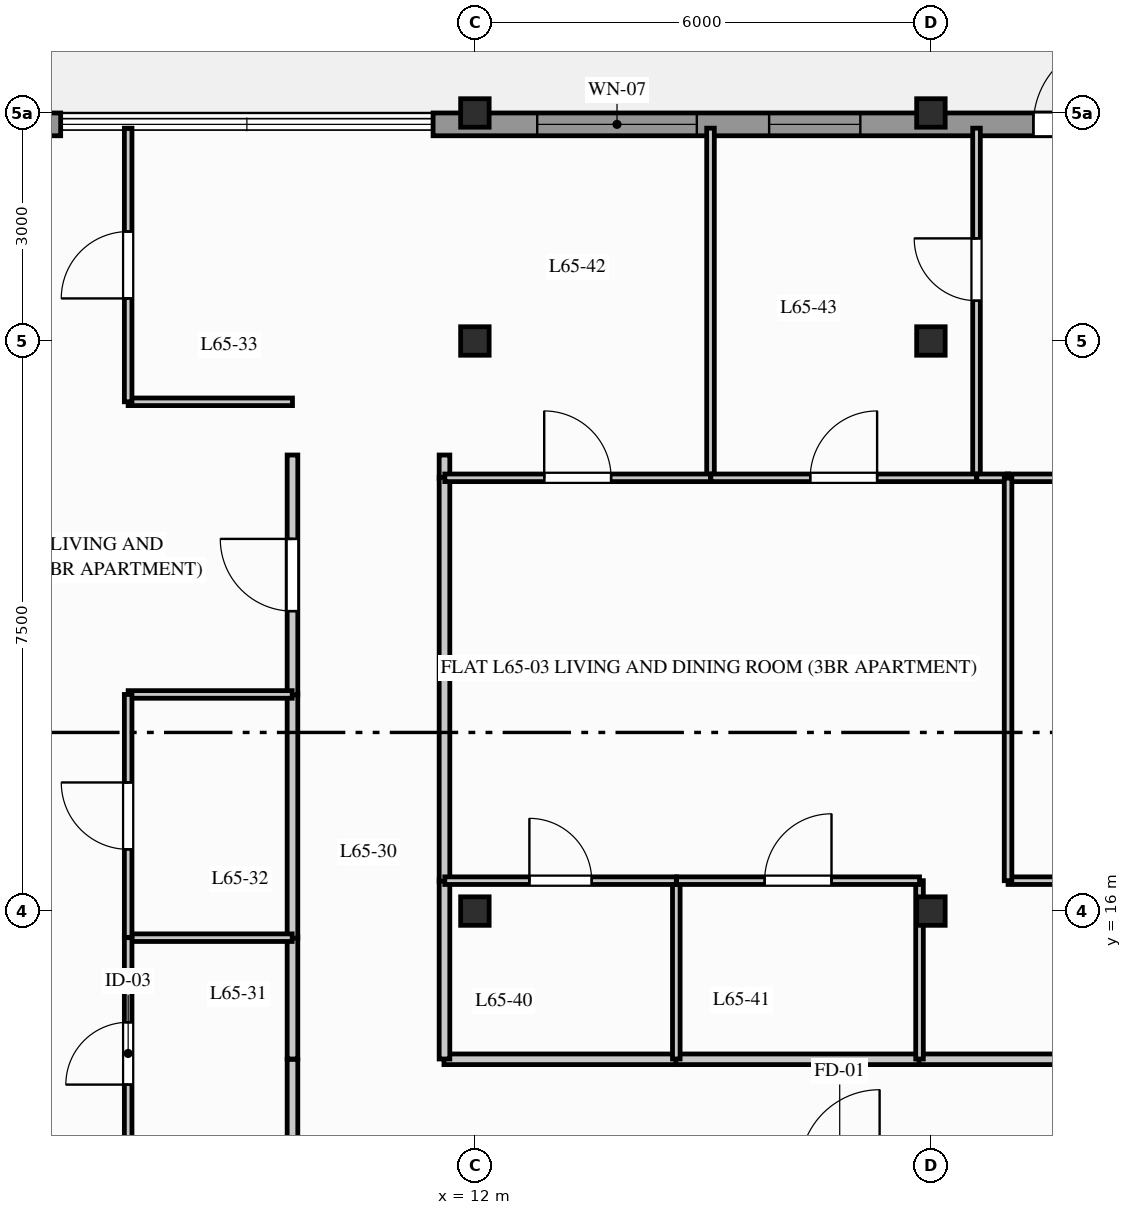
"""IFC4 building model, lengths in metres.
Left out: names, types, materials, properties, quantities, classifications, styles, units other than length and angle.
Written with IfcOpenShell. Run it as: python <this file> out.ifc"""

import sys

from ifc_helpers import new_model, si_unit, direction, frame, frame_2d, origin, origin_2d, place, context, subcontext, project, spatial, rectangle, i_section, extrude, element, fill, save


model = new_model("IFC4")
c1 = context("Model", 3, precision=1e-05, world=origin(), true_north=direction((0.0, 1.0)))
c2 = subcontext(c1, "Body", "Model", "MODEL_VIEW")
j1 = project(units=[si_unit("LENGTHUNIT", "METRE"), si_unit("PLANEANGLEUNIT", "RADIAN")], contexts=[c1])
p1 = place(None, origin())
s1 = spatial("IfcSite", under=j1, at=p1, CompositionType="ELEMENT")
p2 = place(p1, origin())
s2 = spatial("IfcBuilding", under=s1, at=p2, CompositionType="ELEMENT")
p3 = place(p2, frame((0.0, 0.0, 214.4)))
s3 = spatial("IfcBuildingStorey", under=s2, at=p3, CompositionType="ELEMENT", Elevation=214.4)
for number, where, z_axis, x_axis in (
    (1, (12.0, 16.0, 0.0), (0.0, 0.0, 1.0), (1.0, 0.0, 0.0)),
    (2, (12.0, 23.5, 0.0), (0.0, 0.0, 1.0), (1.0, 0.0, 0.0)),
    (3, (12.0, 26.5, 0.0), (0.0, 0.0, 1.0), (1.0, 0.0, 0.0)),
    (4, (18.0, 16.0, 0.0), (0.0, 0.0, 1.0), (1.0, 0.0, 0.0)),
    (5, (18.0, 23.5, 0.0), (0.0, 0.0, 1.0), (1.0, 0.0, 0.0)),
    (6, (18.0, 26.5, 0.0), (0.0, 0.0, 1.0), (1.0, 0.0, 0.0)),
):
    element("IfcColumn", number, at=place(p3, frame(where, z_axis=z_axis, x_axis=x_axis)), inside=s3, PredefinedType="COLUMN", context=c2, shape_type="SweptSolid", body=[
        extrude(i_section(OverallWidth=0.375, OverallDepth=0.375, WebThickness=0.017, FlangeThickness=0.027, FilletRadius=0.015, at=origin_2d()), origin(), (0.0, 0.0, 1.0), 3.6),
    ])
p4 = place(p3, frame((2.5, 26.35, 0.0), z_axis=(0.0, 0.0, 1.0), x_axis=(1.0, 0.0, 0.0)))
e7 = element("IfcWall", 7, at=p4, inside=s3, PredefinedType="STANDARD", context=c2, shape_type="SweptSolid", body=[
    extrude(rectangle(XDim=4.05, YDim=0.3, at=frame_2d((2.025, 0.0))), origin(), (0.0, 0.0, 1.0), 3.33),
])
p5 = place(p3, frame((11.45, 26.35, 0.0), z_axis=(0.0, 0.0, 1.0), x_axis=(1.0, 0.0, 0.0)))
e8 = element("IfcWall", 8, at=p5, inside=s3, PredefinedType="STANDARD", context=c2, shape_type="SweptSolid", body=[
    extrude(rectangle(XDim=16.35, YDim=0.3, at=frame_2d((8.175, 0.0))), origin(), (0.0, 0.0, 1.0), 2.454),
])
p6 = place(p5, frame((7.898, 0.0, 0.0)))
e9 = element("IfcOpeningElement", 9, at=p6, cuts=e8, PredefinedType="OPENING", context=c2, shape_type="SweptSolid", body=[
    extrude(rectangle(XDim=1.1, YDim=2.2, at=frame_2d((0.55, 1.1))), frame((0.0, 0.16, 0.0), z_axis=(0.0, -1.0, 0.0), x_axis=(1.0, 0.0, 0.0)), (0.0, 0.0, 1.0), 0.32),
])
p7 = place(p5, frame((1.37, 0.0, 0.284)))
e10 = element("IfcOpeningElement", 10, at=p7, cuts=e8, PredefinedType="OPENING", context=c2, shape_type="SweptSolid", body=[
    extrude(rectangle(XDim=2.1, YDim=1.95, at=frame_2d((1.05, 0.975))), frame((0.0, 0.16, 0.0), z_axis=(0.0, -1.0, 0.0), x_axis=(1.0, 0.0, 0.0)), (0.0, 0.0, 1.0), 0.32),
])
p8 = place(p5, frame((4.421, 0.0, 0.634)))
e11 = element("IfcOpeningElement", 11, at=p8, cuts=e8, PredefinedType="OPENING", context=c2, shape_type="SweptSolid", body=[
    extrude(rectangle(XDim=1.2, YDim=1.6, at=frame_2d((0.6, 0.8))), frame((0.0, 0.16, 0.0), z_axis=(0.0, -1.0, 0.0), x_axis=(1.0, 0.0, 0.0)), (0.0, 0.0, 1.0), 0.32),
])
p9 = place(p3, frame((9.6, 12.6, 0.0), z_axis=(0.0, 0.0, 1.0), x_axis=(0.0, 1.0, 0.0)))
e12 = element("IfcWall", 12, at=p9, inside=s3, PredefinedType="PARTITIONING", context=c2, shape_type="SweptSolid", body=[
    extrude(rectangle(XDim=1.45, YDim=0.14, at=frame_2d((0.725, 0.0))), origin(), (0.0, 0.0, 1.0), 3.33),
])
p10 = place(p3, frame((11.593, 14.05, 0.0), z_axis=(0.0, 0.0, 1.0), x_axis=(1.0, 0.0, 0.0)))
e13 = element("IfcWall", 13, at=p10, inside=s3, PredefinedType="PARTITIONING", context=c2, shape_type="SweptSolid", body=[
    extrude(rectangle(XDim=3.069, YDim=0.14, at=frame_2d((1.534, 0.0))), origin(), (0.0, 0.0, 1.0), 2.685),
])
p11 = place(p3, frame((14.643, 14.05, 0.0), z_axis=(0.0, 0.0, 1.0), x_axis=(1.0, 0.0, 0.0)))
e14 = element("IfcWall", 14, at=p11, inside=s3, PredefinedType="PARTITIONING", context=c2, shape_type="SweptSolid", body=[
    extrude(rectangle(XDim=3.219, YDim=0.14, at=frame_2d((1.609, 0.0))), origin(), (0.0, 0.0, 1.0), 2.685),
])
p12 = place(p3, frame((17.843, 14.05, 0.0), z_axis=(0.0, 0.0, 1.0), x_axis=(1.0, 0.0, 0.0)))
e15 = element("IfcWall", 15, at=p12, inside=s3, PredefinedType="PARTITIONING", context=c2, shape_type="SweptSolid", body=[
    extrude(rectangle(XDim=6.668, YDim=0.14, at=frame_2d((3.334, 0.0))), origin(), (0.0, 0.0, 1.0), 2.685),
])
p13 = place(p12, frame((2.859, 0.0, 0.0)))
e16 = element("IfcOpeningElement", 16, at=p13, cuts=e15, PredefinedType="OPENING", context=c2, shape_type="SweptSolid", body=[
    extrude(rectangle(XDim=0.95, YDim=2.05, at=frame_2d((0.475, 1.025))), frame((0.0, 0.08, 0.0), z_axis=(0.0, -1.0, 0.0), x_axis=(1.0, 0.0, 0.0)), (0.0, 0.0, 1.0), 0.16),
])
p14 = place(p3, frame((9.6, 14.054, 0.0), z_axis=(0.0, 0.0, 1.0), x_axis=(0.0, 1.0, 0.0)))
e17 = element("IfcWall", 17, at=p14, inside=s3, PredefinedType="PARTITIONING", context=c2, shape_type="SweptSolid", body=[
    extrude(rectangle(XDim=1.607, YDim=0.14, at=frame_2d((0.804, 0.0))), origin(), (0.0, 0.0, 1.0), 3.33),
])
p15 = place(p3, frame((9.6, 15.643, 0.0), z_axis=(0.0, 0.0, 1.0), x_axis=(0.0, 1.0, 0.0)))
e18 = element("IfcWall", 18, at=p15, inside=s3, PredefinedType="PARTITIONING", context=c2, shape_type="SweptSolid", body=[
    extrude(rectangle(XDim=3.219, YDim=0.14, at=frame_2d((1.609, 0.0))), origin(), (0.0, 0.0, 1.0), 2.685),
])
p16 = place(p3, frame((9.6, 18.843, 0.0), z_axis=(0.0, 0.0, 1.0), x_axis=(0.0, 1.0, 0.0)))
e19 = element("IfcWall", 19, at=p16, inside=s3, PredefinedType="PARTITIONING", context=c2, shape_type="SweptSolid", body=[
    extrude(rectangle(XDim=3.157, YDim=0.14, at=frame_2d((1.579, 0.0))), origin(), (0.0, 0.0, 1.0), 2.899),
])
p17 = place(p16, frame((1.104, 0.0, 0.0)))
e20 = element("IfcOpeningElement", 20, at=p17, cuts=e19, PredefinedType="OPENING", context=c2, shape_type="SweptSolid", body=[
    extrude(rectangle(XDim=0.95, YDim=2.05, at=frame_2d((0.475, 1.025))), frame((0.0, 0.08, 0.0), z_axis=(0.0, -1.0, 0.0), x_axis=(1.0, 0.0, 0.0)), (0.0, 0.0, 1.0), 0.16),
])
p18 = place(p3, frame((11.6, 14.054, 0.0), z_axis=(0.0, 0.0, 1.0), x_axis=(0.0, 1.0, 0.0)))
e21 = element("IfcWall", 21, at=p18, inside=s3, PredefinedType="PARTITIONING", context=c2, shape_type="SweptSolid", body=[
    extrude(rectangle(XDim=2.357, YDim=0.14, at=frame_2d((1.179, 0.0))), origin(), (0.0, 0.0, 1.0), 2.685),
])
p19 = place(p3, frame((11.6, 21.689, 0.0), z_axis=(0.0, 0.0, 1.0), x_axis=(0.0, 1.0, 0.0)))
e22 = element("IfcWall", 22, at=p19, inside=s3, PredefinedType="PARTITIONING", context=c2, shape_type="SweptSolid", body=[
    extrude(rectangle(XDim=0.311, YDim=0.14, at=frame_2d((0.156, 0.0))), origin(), (0.0, 0.0, 1.0), 3.33),
])
p20 = place(p3, frame((11.6, 16.393, 0.0), z_axis=(0.0, 0.0, 1.0), x_axis=(0.0, 1.0, 0.0)))
e23 = element("IfcWall", 23, at=p20, inside=s3, PredefinedType="PARTITIONING", context=c2, shape_type="SweptSolid", body=[
    extrude(rectangle(XDim=5.315, YDim=0.14, at=frame_2d((2.657, 0.0))), origin(), (0.0, 0.0, 1.0), 2.899),
])
p21 = place(p3, frame((7.438, 15.65, 0.0), z_axis=(0.0, 0.0, 1.0), x_axis=(1.0, 0.0, 0.0)))
e24 = element("IfcWall", 24, at=p21, inside=s3, PredefinedType="PARTITIONING", context=c2, shape_type="SweptSolid", body=[
    extrude(rectangle(XDim=2.158, YDim=0.1, at=frame_2d((1.079, 0.0))), origin(), (0.0, 0.0, 1.0), 3.33),
])
p22 = place(p3, frame((7.438, 12.604, 0.0), z_axis=(0.0, 0.0, 1.0), x_axis=(0.0, 1.0, 0.0)))
e25 = element("IfcWall", 25, at=p22, inside=s3, PredefinedType="PARTITIONING", context=c2, shape_type="SweptSolid", body=[
    extrude(rectangle(XDim=3.046, YDim=0.1, at=frame_2d((1.523, 0.0))), origin(), (0.0, 0.0, 1.0), 3.33),
])
p23 = place(p22, frame((1.113, 0.0, 0.0)))
e26 = element("IfcOpeningElement", 26, at=p23, cuts=e25, PredefinedType="OPENING", context=c2, shape_type="SweptSolid", body=[
    extrude(rectangle(XDim=0.82, YDim=2.02, at=frame_2d((0.41, 1.01))), frame((0.0, 0.06, 0.0), z_axis=(0.0, -1.0, 0.0), x_axis=(1.0, 0.0, 0.0)), (0.0, 0.0, 1.0), 0.12),
])
p24 = place(p3, frame((7.438, 18.85, 0.0), z_axis=(0.0, 0.0, 1.0), x_axis=(1.0, 0.0, 0.0)))
e27 = element("IfcWall", 27, at=p24, inside=s3, PredefinedType="PARTITIONING", context=c2, shape_type="SweptSolid", body=[
    extrude(rectangle(XDim=2.158, YDim=0.1, at=frame_2d((1.079, 0.0))), origin(), (0.0, 0.0, 1.0), 3.33),
])
p25 = place(p3, frame((7.438, 15.654, 0.0), z_axis=(0.0, 0.0, 1.0), x_axis=(0.0, 1.0, 0.0)))
e28 = element("IfcWall", 28, at=p25, inside=s3, PredefinedType="PARTITIONING", context=c2, shape_type="SweptSolid", body=[
    extrude(rectangle(XDim=3.196, YDim=0.1, at=frame_2d((1.598, 0.0))), origin(), (0.0, 0.0, 1.0), 2.685),
])
p26 = place(p25, frame((1.158, 0.0, 0.0)))
e29 = element("IfcOpeningElement", 29, at=p26, cuts=e28, PredefinedType="OPENING", context=c2, shape_type="SweptSolid", body=[
    extrude(rectangle(XDim=0.88, YDim=2.04, at=frame_2d((0.44, 1.02))), frame((0.0, 0.06, 0.0), z_axis=(0.0, -1.0, 0.0), x_axis=(1.0, 0.0, 0.0)), (0.0, 0.0, 1.0), 0.12),
])
p27 = place(p3, frame((7.438, 22.7, 0.0), z_axis=(0.0, 0.0, 1.0), x_axis=(1.0, 0.0, 0.0)))
e30 = element("IfcWall", 30, at=p27, inside=s3, PredefinedType="PARTITIONING", context=c2, shape_type="SweptSolid", body=[
    extrude(rectangle(XDim=2.162, YDim=0.1, at=frame_2d((1.081, 0.0))), origin(), (0.0, 0.0, 1.0), 3.33),
])
p28 = place(p3, frame((7.438, 22.7, 0.0), z_axis=(0.0, 0.0, 1.0), x_axis=(0.0, 1.0, 0.0)))
e31 = element("IfcWall", 31, at=p28, inside=s3, PredefinedType="PARTITIONING", context=c2, shape_type="SweptSolid", body=[
    extrude(rectangle(XDim=3.6, YDim=0.1, at=frame_2d((1.8, 0.0))), origin(), (0.0, 0.0, 1.0), 2.685),
])
p29 = place(p28, frame((1.36, 0.0, 0.0)))
e32 = element("IfcOpeningElement", 32, at=p29, cuts=e31, PredefinedType="OPENING", context=c2, shape_type="SweptSolid", body=[
    extrude(rectangle(XDim=0.88, YDim=2.04, at=frame_2d((0.44, 1.02))), frame((0.0, 0.06, 0.0), z_axis=(0.0, -1.0, 0.0), x_axis=(1.0, 0.0, 0.0)), (0.0, 0.0, 1.0), 0.12),
])
p30 = place(p3, frame((14.65, 14.054, 0.0), z_axis=(0.0, 0.0, 1.0), x_axis=(0.0, 1.0, 0.0)))
e33 = element("IfcWall", 33, at=p30, inside=s3, PredefinedType="PARTITIONING", context=c2, shape_type="SweptSolid", body=[
    extrude(rectangle(XDim=2.346, YDim=0.1, at=frame_2d((1.173, 0.0))), origin(), (0.0, 0.0, 1.0), 2.685),
])
p31 = place(p3, frame((11.604, 16.4, 0.0), z_axis=(0.0, 0.0, 1.0), x_axis=(1.0, 0.0, 0.0)))
e34 = element("IfcWall", 34, at=p31, inside=s3, PredefinedType="PARTITIONING", context=c2, shape_type="SweptSolid", body=[
    extrude(rectangle(XDim=3.046, YDim=0.1, at=frame_2d((1.523, 0.0))), origin(), (0.0, 0.0, 1.0), 2.685),
])
p32 = place(p31, frame((1.113, 0.0, 0.0)))
e35 = element("IfcOpeningElement", 35, at=p32, cuts=e34, PredefinedType="OPENING", context=c2, shape_type="SweptSolid", body=[
    extrude(rectangle(XDim=0.82, YDim=2.02, at=frame_2d((0.41, 1.01))), frame((0.0, 0.06, 0.0), z_axis=(0.0, -1.0, 0.0), x_axis=(1.0, 0.0, 0.0)), (0.0, 0.0, 1.0), 0.12),
])
p33 = place(p3, frame((17.85, 14.054, 0.0), z_axis=(0.0, 0.0, 1.0), x_axis=(0.0, 1.0, 0.0)))
e36 = element("IfcWall", 36, at=p33, inside=s3, PredefinedType="PARTITIONING", context=c2, shape_type="SweptSolid", body=[
    extrude(rectangle(XDim=2.346, YDim=0.1, at=frame_2d((1.173, 0.0))), origin(), (0.0, 0.0, 1.0), 2.685),
])
p34 = place(p3, frame((14.654, 16.4, 0.0), z_axis=(0.0, 0.0, 1.0), x_axis=(1.0, 0.0, 0.0)))
e37 = element("IfcWall", 37, at=p34, inside=s3, PredefinedType="PARTITIONING", context=c2, shape_type="SweptSolid", body=[
    extrude(rectangle(XDim=3.196, YDim=0.1, at=frame_2d((1.598, 0.0))), origin(), (0.0, 0.0, 1.0), 2.685),
])
p35 = place(p34, frame((1.158, 0.0, 0.0)))
e38 = element("IfcOpeningElement", 38, at=p35, cuts=e37, PredefinedType="OPENING", context=c2, shape_type="SweptSolid", body=[
    extrude(rectangle(XDim=0.88, YDim=2.04, at=frame_2d((0.44, 1.02))), frame((0.0, 0.06, 0.0), z_axis=(0.0, -1.0, 0.0), x_axis=(1.0, 0.0, 0.0)), (0.0, 0.0, 1.0), 0.12),
])
p36 = place(p3, frame((15.1, 21.7, 0.0), z_axis=(0.0, 0.0, 1.0), x_axis=(0.0, 1.0, 0.0)))
e39 = element("IfcWall", 39, at=p36, inside=s3, PredefinedType="PARTITIONING", context=c2, shape_type="SweptSolid", body=[
    extrude(rectangle(XDim=4.6, YDim=0.1, at=frame_2d((2.3, 0.0))), origin(), (0.0, 0.0, 1.0), 2.685),
])
p37 = place(p3, frame((11.604, 21.7, 0.0), z_axis=(0.0, 0.0, 1.0), x_axis=(1.0, 0.0, 0.0)))
e40 = element("IfcWall", 40, at=p37, inside=s3, PredefinedType="PARTITIONING", context=c2, shape_type="SweptSolid", body=[
    extrude(rectangle(XDim=3.496, YDim=0.1, at=frame_2d((1.748, 0.0))), origin(), (0.0, 0.0, 1.0), 2.685),
])
p38 = place(p37, frame((1.308, 0.0, 0.0)))
e41 = element("IfcOpeningElement", 41, at=p38, cuts=e40, PredefinedType="OPENING", context=c2, shape_type="SweptSolid", body=[
    extrude(rectangle(XDim=0.88, YDim=2.04, at=frame_2d((0.44, 1.02))), frame((0.0, 0.06, 0.0), z_axis=(0.0, -1.0, 0.0), x_axis=(1.0, 0.0, 0.0)), (0.0, 0.0, 1.0), 0.12),
])
p39 = place(p3, frame((18.6, 21.7, 0.0), z_axis=(0.0, 0.0, 1.0), x_axis=(0.0, 1.0, 0.0)))
e42 = element("IfcWall", 42, at=p39, inside=s3, PredefinedType="PARTITIONING", context=c2, shape_type="SweptSolid", body=[
    extrude(rectangle(XDim=4.6, YDim=0.1, at=frame_2d((2.3, 0.0))), origin(), (0.0, 0.0, 1.0), 2.685),
])
p40 = place(p39, frame((2.33, 0.0, 0.0)))
e43 = element("IfcOpeningElement", 43, at=p40, cuts=e42, PredefinedType="OPENING", context=c2, shape_type="SweptSolid", body=[
    extrude(rectangle(XDim=0.82, YDim=2.02, at=frame_2d((0.41, 1.01))), frame((0.0, 0.06, 0.0), z_axis=(0.0, -1.0, 0.0), x_axis=(1.0, 0.0, 0.0)), (0.0, 0.0, 1.0), 0.12),
])
p41 = place(p3, frame((15.104, 21.7, 0.0), z_axis=(0.0, 0.0, 1.0), x_axis=(1.0, 0.0, 0.0)))
e44 = element("IfcWall", 44, at=p41, inside=s3, PredefinedType="PARTITIONING", context=c2, shape_type="SweptSolid", body=[
    extrude(rectangle(XDim=3.496, YDim=0.1, at=frame_2d((1.748, 0.0))), origin(), (0.0, 0.0, 1.0), 2.685),
])
p42 = place(p41, frame((1.308, 0.0, 0.0)))
e45 = element("IfcOpeningElement", 45, at=p42, cuts=e44, PredefinedType="OPENING", context=c2, shape_type="SweptSolid", body=[
    extrude(rectangle(XDim=0.88, YDim=2.04, at=frame_2d((0.44, 1.02))), frame((0.0, 0.06, 0.0), z_axis=(0.0, -1.0, 0.0), x_axis=(1.0, 0.0, 0.0)), (0.0, 0.0, 1.0), 0.12),
])
p43 = place(p3, frame((19.004, 21.7, 0.0), z_axis=(0.0, 0.0, 1.0), x_axis=(1.0, 0.0, 0.0)))
e46 = element("IfcWall", 46, at=p43, inside=s3, PredefinedType="PARTITIONING", context=c2, shape_type="SweptSolid", body=[
    extrude(rectangle(XDim=3.096, YDim=0.1, at=frame_2d((1.548, 0.0))), origin(), (0.0, 0.0, 1.0), 2.685),
])
p44 = place(p3, frame((18.604, 21.7, 0.0), z_axis=(0.0, 0.0, 1.0), x_axis=(1.0, 0.0, 0.0)))
e47 = element("IfcWall", 47, at=p44, inside=s3, PredefinedType="PARTITIONING", context=c2, shape_type="SweptSolid", body=[
    extrude(rectangle(XDim=0.418, YDim=0.1, at=frame_2d((0.209, 0.0))), origin(), (0.0, 0.0, 1.0), 3.33),
])
p45 = place(p3, frame((19.015, 16.4, 0.0), z_axis=(0.0, 0.0, 1.0), x_axis=(1.0, 0.0, 0.0)))
e48 = element("IfcWall", 48, at=p45, inside=s3, PredefinedType="PARTITIONING", context=c2, shape_type="SweptSolid", body=[
    extrude(rectangle(XDim=5.485, YDim=0.1, at=frame_2d((2.743, 0.0))), origin(), (0.0, 0.0, 1.0), 2.685),
])
p46 = place(p45, frame((1.423, 0.0, 0.0)))
e49 = element("IfcOpeningElement", 49, at=p46, cuts=e48, PredefinedType="OPENING", context=c2, shape_type="SweptSolid", body=[
    extrude(rectangle(XDim=0.88, YDim=2.04, at=frame_2d((0.44, 1.02))), frame((0.0, 0.06, 0.0), z_axis=(0.0, -1.0, 0.0), x_axis=(1.0, 0.0, 0.0)), (0.0, 0.0, 1.0), 0.12),
])
p47 = place(p3, frame((19.015, 16.4, 0.0), z_axis=(0.0, 0.0, 1.0), x_axis=(0.0, 1.0, 0.0)))
e50 = element("IfcWall", 50, at=p47, inside=s3, PredefinedType="PARTITIONING", context=c2, shape_type="SweptSolid", body=[
    extrude(rectangle(XDim=5.296, YDim=0.1, at=frame_2d((2.648, 0.0))), origin(), (0.0, 0.0, 1.0), 2.899),
])
p48 = place(p6, origin())
e51 = element("IfcDoor", 51, at=p48, inside=s3, OperationType="SINGLE_SWING_RIGHT", PredefinedType="DOOR", context=c2, shape_type="SweptSolid", body=[
    extrude(rectangle(XDim=1.1, YDim=2.2, at=frame_2d((0.55, 1.1))), frame((0.0, 0.025, 0.0), z_axis=(0.0, -1.0, 0.0), x_axis=(1.0, 0.0, 0.0)), (0.0, 0.0, 1.0), 0.05),
])
fill(e9, e51)
p49 = place(p7, origin())
e52 = element("IfcWindow", 52, at=p49, inside=s3, PartitioningType="SINGLE_PANEL", PredefinedType="WINDOW", context=c2, shape_type="SweptSolid", body=[
    extrude(rectangle(XDim=2.1, YDim=1.95, at=frame_2d((1.05, 0.975))), frame((0.0, 0.03, 0.0), z_axis=(0.0, -1.0, 0.0), x_axis=(1.0, 0.0, 0.0)), (0.0, 0.0, 1.0), 0.06),
])
fill(e10, e52)
p50 = place(p17, origin())
e53 = element("IfcDoor", 53, at=p50, inside=s3, OperationType="SINGLE_SWING_RIGHT", PredefinedType="DOOR", context=c2, shape_type="SweptSolid", body=[
    extrude(rectangle(XDim=0.95, YDim=2.05, at=frame_2d((0.475, 1.025))), frame((0.0, 0.025, 0.0), z_axis=(0.0, -1.0, 0.0), x_axis=(1.0, 0.0, 0.0)), (0.0, 0.0, 1.0), 0.05),
])
fill(e20, e53)
p51 = place(p23, origin())
e54 = element("IfcDoor", 54, at=p51, inside=s3, OperationType="SINGLE_SWING_LEFT", PredefinedType="DOOR", context=c2, shape_type="SweptSolid", body=[
    extrude(rectangle(XDim=0.82, YDim=2.02, at=frame_2d((0.41, 1.01))), frame((0.0, 0.025, 0.0), z_axis=(0.0, -1.0, 0.0), x_axis=(1.0, 0.0, 0.0)), (0.0, 0.0, 1.0), 0.05),
])
fill(e26, e54)
p52 = place(p26, origin())
e55 = element("IfcDoor", 55, at=p52, inside=s3, OperationType="SINGLE_SWING_RIGHT", PredefinedType="DOOR", context=c2, shape_type="SweptSolid", body=[
    extrude(rectangle(XDim=0.88, YDim=2.04, at=frame_2d((0.44, 1.02))), frame((0.0, 0.025, 0.0), z_axis=(0.0, -1.0, 0.0), x_axis=(1.0, 0.0, 0.0)), (0.0, 0.0, 1.0), 0.05),
])
fill(e29, e55)
p53 = place(p29, origin())
e56 = element("IfcDoor", 56, at=p53, inside=s3, OperationType="SINGLE_SWING_LEFT", PredefinedType="DOOR", context=c2, shape_type="SweptSolid", body=[
    extrude(rectangle(XDim=0.88, YDim=2.04, at=frame_2d((0.44, 1.02))), frame((0.0, 0.025, 0.0), z_axis=(0.0, -1.0, 0.0), x_axis=(1.0, 0.0, 0.0)), (0.0, 0.0, 1.0), 0.05),
])
fill(e32, e56)
p54 = place(p32, origin())
e57 = element("IfcDoor", 57, at=p54, inside=s3, OperationType="SINGLE_SWING_LEFT", PredefinedType="DOOR", context=c2, shape_type="SweptSolid", body=[
    extrude(rectangle(XDim=0.82, YDim=2.02, at=frame_2d((0.41, 1.01))), frame((0.0, 0.025, 0.0), z_axis=(0.0, -1.0, 0.0), x_axis=(1.0, 0.0, 0.0)), (0.0, 0.0, 1.0), 0.05),
])
fill(e35, e57)
p55 = place(p35, origin())
e58 = element("IfcDoor", 58, at=p55, inside=s3, OperationType="SINGLE_SWING_RIGHT", PredefinedType="DOOR", context=c2, shape_type="SweptSolid", body=[
    extrude(rectangle(XDim=0.88, YDim=2.04, at=frame_2d((0.44, 1.02))), frame((0.0, 0.025, 0.0), z_axis=(0.0, -1.0, 0.0), x_axis=(1.0, 0.0, 0.0)), (0.0, 0.0, 1.0), 0.05),
])
fill(e38, e58)
p56 = place(p38, origin())
e59 = element("IfcDoor", 59, at=p56, inside=s3, OperationType="SINGLE_SWING_LEFT", PredefinedType="DOOR", context=c2, shape_type="SweptSolid", body=[
    extrude(rectangle(XDim=0.88, YDim=2.04, at=frame_2d((0.44, 1.02))), frame((0.0, 0.025, 0.0), z_axis=(0.0, -1.0, 0.0), x_axis=(1.0, 0.0, 0.0)), (0.0, 0.0, 1.0), 0.05),
])
fill(e41, e59)
p57 = place(p42, origin())
e60 = element("IfcDoor", 60, at=p57, inside=s3, OperationType="SINGLE_SWING_RIGHT", PredefinedType="DOOR", context=c2, shape_type="SweptSolid", body=[
    extrude(rectangle(XDim=0.88, YDim=2.04, at=frame_2d((0.44, 1.02))), frame((0.0, 0.025, 0.0), z_axis=(0.0, -1.0, 0.0), x_axis=(1.0, 0.0, 0.0)), (0.0, 0.0, 1.0), 0.05),
])
fill(e45, e60)
p58 = place(p40, origin())
e61 = element("IfcDoor", 61, at=p58, inside=s3, OperationType="SINGLE_SWING_RIGHT", PredefinedType="DOOR", context=c2, shape_type="SweptSolid", body=[
    extrude(rectangle(XDim=0.82, YDim=2.02, at=frame_2d((0.41, 1.01))), frame((0.0, 0.025, 0.0), z_axis=(0.0, -1.0, 0.0), x_axis=(1.0, 0.0, 0.0)), (0.0, 0.0, 1.0), 0.05),
])
fill(e43, e61)
p59 = place(p8, origin())
e62 = element("IfcWindow", 62, at=p59, inside=s3, PartitioningType="SINGLE_PANEL", PredefinedType="WINDOW", context=c2, shape_type="SweptSolid", body=[
    extrude(rectangle(XDim=1.2, YDim=1.6, at=frame_2d((0.6, 0.8))), frame((0.0, 0.03, 0.0), z_axis=(0.0, -1.0, 0.0), x_axis=(1.0, 0.0, 0.0)), (0.0, 0.0, 1.0), 0.06),
])
fill(e11, e62)
save(model, sys.argv[1])
